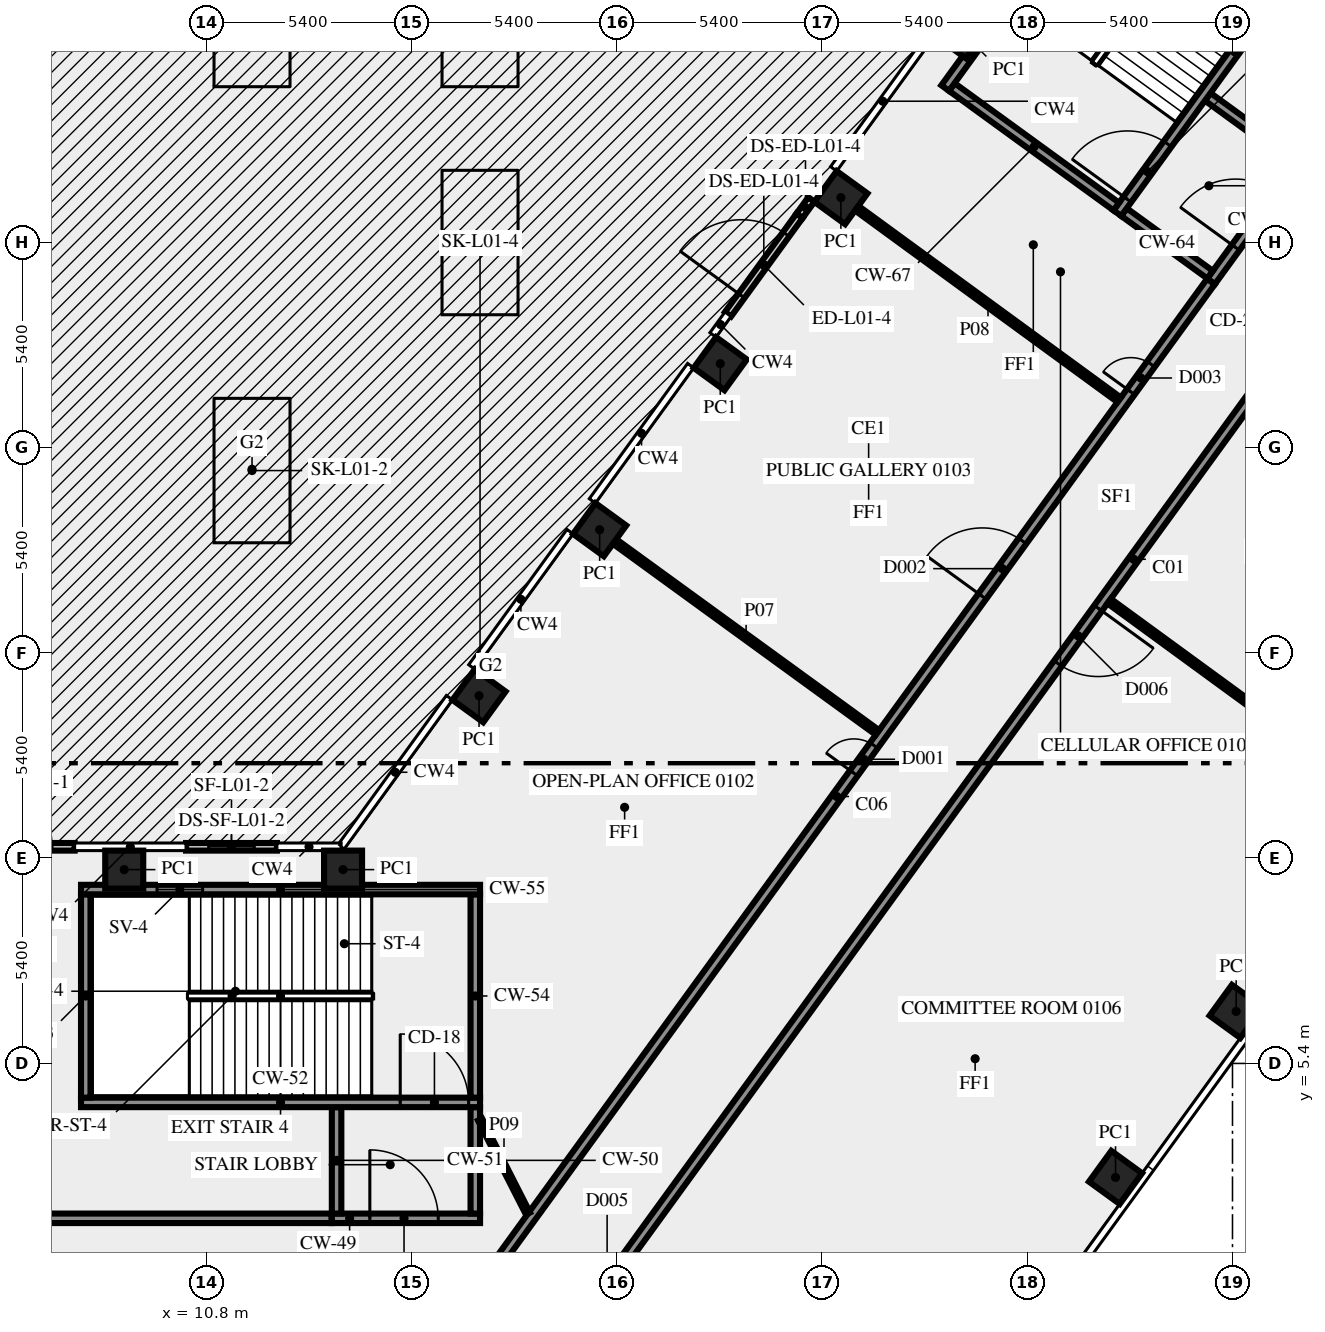
"""IFC4 building model, lengths in metres.
Left out: names, types, materials, properties, quantities, classifications, styles, units other than length and angle.
Written with IfcOpenShell. Run it as: python <this file> out.ifc"""

import sys

from ifc_helpers import new_model, si_unit, direction, frame, frame_2d, origin, origin_2d, place, context, subcontext, project, spatial, rectangle, extrude, element, fill, save


model = new_model("IFC4")
c1 = context("Model", 3, precision=1e-05, world=origin(), true_north=direction((0.0, 1.0)))
c2 = subcontext(c1, "Body", "Model", "MODEL_VIEW")
j1 = project(units=[si_unit("LENGTHUNIT", "METRE"), si_unit("PLANEANGLEUNIT", "RADIAN")], contexts=[c1])
p1 = place(None, origin())
s1 = spatial("IfcSite", under=j1, at=p1, CompositionType="ELEMENT")
p2 = place(p1, origin())
s2 = spatial("IfcBuilding", under=s1, at=p2, CompositionType="ELEMENT")
p3 = place(p2, frame((0.0, 0.0, 6.0)))
s3 = spatial("IfcBuildingStorey", under=s2, at=p3, CompositionType="ELEMENT", Elevation=6.0)
for number, where, z_axis, x_axis in (
    (1, (34.722, 2.4, 0.0), (0.0, 0.0, 1.0), (0.588, 0.809, 0.0)),
    (2, (37.896, 6.769, 0.0), (0.0, 0.0, 1.0), (0.588, 0.809, 0.0)),
    (3, (30.669, 32.55, 0.0), (0.0, 0.0, 1.0), (-0.588, -0.809, 0.0)),
    (4, (27.495, 28.181, 0.0), (0.0, 0.0, 1.0), (-0.588, -0.809, 0.0)),
    (5, (24.321, 23.812, 0.0), (0.0, 0.0, 1.0), (-0.588, -0.809, 0.0)),
    (6, (21.147, 19.444, 0.0), (0.0, 0.0, 1.0), (-0.588, -0.809, 0.0)),
    (7, (17.974, 15.075, 0.0), (0.0, 0.0, 1.0), (-0.588, -0.809, 0.0)),
    (8, (14.395, 10.5, 0.0), (0.0, 0.0, 1.0), (-1.0, 0.0, 0.0)),
    (9, (8.637, 10.5, 0.0), (0.0, 0.0, 1.0), (-1.0, 0.0, 0.0)),
):
    element("IfcColumn", number, at=place(p3, frame(where, z_axis=z_axis, x_axis=x_axis)), inside=s3, PredefinedType="COLUMN", context=c2, shape_type="SweptSolid", body=[
        extrude(rectangle(XDim=1.0, YDim=1.0, at=origin_2d()), origin(), (0.0, 0.0, 1.0), 5.1),
    ])
p4 = place(p3, frame((24.525, 25.113, 0.0), z_axis=(0.0, 0.0, 1.0), x_axis=(0.587800113352, 0.809006196974, 0.0)))
e10 = element("IfcWall", 10, at=p4, inside=s3, PredefinedType="SOLIDWALL", context=c2, shape_type="SweptSolid", body=[
    extrude(rectangle(XDim=3.204, YDim=0.2, at=frame_2d((1.602, 0.0))), origin(), (0.0, 0.0, 1.0), 5.1),
])
p5 = place(p4, frame((0.602, 0.0, 0.0)))
e11 = element("IfcOpeningElement", 11, at=p5, cuts=e10, PredefinedType="OPENING", context=c2, shape_type="SweptSolid", body=[
    extrude(rectangle(XDim=2.0, YDim=2.4, at=frame_2d((1.0, 1.2))), frame((0.0, 0.11, 0.0), z_axis=(0.0, -1.0, 0.0), x_axis=(1.0, 0.0, 0.0)), (0.0, 0.0, 1.0), 0.22),
])
p6 = place(p3, frame((12.655, 11.1, 0.0), z_axis=(0.0, 0.0, 1.0), x_axis=(-1.0, 0.0, 0.0)))
e12 = element("IfcWall", 12, at=p6, inside=s3, PredefinedType="SOLIDWALL", context=c2, shape_type="SweptSolid", body=[
    extrude(rectangle(XDim=2.392, YDim=0.2, at=frame_2d((1.196, 0.0))), origin(), (0.0, 0.0, 1.0), 5.1),
])
p7 = place(p6, frame((0.596, 0.0, 1.0)))
e13 = element("IfcOpeningElement", 13, at=p7, cuts=e12, PredefinedType="OPENING", context=c2, shape_type="SweptSolid", body=[
    extrude(rectangle(XDim=1.2, YDim=1.2, at=frame_2d((0.6, 0.6))), frame((0.0, 0.11, 0.0), z_axis=(0.0, -1.0, 0.0), x_axis=(1.0, 0.0, 0.0)), (0.0, 0.0, 1.0), 0.22),
])
p8 = place(p3, frame((4.143, 11.1, 0.0), z_axis=(0.0, 0.0, 1.0), x_axis=(1.0, 0.0, 0.0)))
e14 = element("IfcWall", 14, at=p8, inside=s3, PredefinedType="SOLIDWALL", context=c2, shape_type="SweptSolid", body=[
    extrude(rectangle(XDim=3.189, YDim=0.2, at=frame_2d((1.594, 0.0))), origin(), (0.0, 0.0, 1.0), 5.1),
])
p9 = place(p8, frame((0.594, 0.0, 0.0)))
e15 = element("IfcOpeningElement", 15, at=p9, cuts=e14, PredefinedType="OPENING", context=c2, shape_type="SweptSolid", body=[
    extrude(rectangle(XDim=2.0, YDim=2.4, at=frame_2d((1.0, 1.2))), frame((0.0, 0.11, 0.0), z_axis=(0.0, -1.0, 0.0), x_axis=(1.0, 0.0, 0.0)), (0.0, 0.0, 1.0), 0.22),
])
p10 = place(p3, frame((14.1, 1.325, 0.0), z_axis=(0.0, 0.0, 1.0), x_axis=(1.0, 0.0, 0.0)))
e16 = element("IfcWall", 16, at=p10, inside=s3, PredefinedType="SHEAR", context=c2, shape_type="SweptSolid", body=[
    extrude(rectangle(XDim=3.9, YDim=0.25, at=frame_2d((1.95, 0.0))), origin(), (0.0, 0.0, 1.0), 5.1),
])
p11 = place(p10, frame((1.0, 0.0, 0.0)))
e17 = element("IfcOpeningElement", 17, at=p11, cuts=e16, PredefinedType="OPENING", context=c2, shape_type="SweptSolid", body=[
    extrude(rectangle(XDim=1.8, YDim=2.1, at=frame_2d((0.9, 1.05))), frame((0.0, 0.135, 0.0), z_axis=(0.0, -1.0, 0.0), x_axis=(1.0, 0.0, 0.0)), (0.0, 0.0, 1.0), 0.27),
])
for number, where, z_axis, x_axis in (
    (18, (14.225, 1.45, 0.0), (0.0, 0.0, 1.0), (0.0, 1.0, 0.0)),
    (19, (17.875, 1.45, 0.0), (0.0, 0.0, 1.0), (0.0, 1.0, 0.0)),
):
    element("IfcWall", number, at=place(p3, frame(where, z_axis=z_axis, x_axis=x_axis)), inside=s3, PredefinedType="SHEAR", context=c2, shape_type="SweptSolid", body=[
        extrude(rectangle(XDim=2.8, YDim=0.25, at=frame_2d((1.4, 0.0))), origin(), (0.0, 0.0, 1.0), 5.1),
    ])
p12 = place(p3, frame((7.5, 4.375, 0.0), z_axis=(0.0, 0.0, 1.0), x_axis=(1.0, 0.0, 0.0)))
e20 = element("IfcWall", 20, at=p12, inside=s3, PredefinedType="SHEAR", context=c2, shape_type="SweptSolid", body=[
    extrude(rectangle(XDim=10.5, YDim=0.25, at=frame_2d((5.25, 0.0))), origin(), (0.0, 0.0, 1.0), 5.1),
])
p13 = place(p12, frame((8.4, 0.0, 0.0)))
e21 = element("IfcOpeningElement", 21, at=p13, cuts=e20, PredefinedType="OPENING", context=c2, shape_type="SweptSolid", body=[
    extrude(rectangle(XDim=1.8, YDim=2.1, at=frame_2d((0.9, 1.05))), frame((0.0, 0.135, 0.0), z_axis=(0.0, -1.0, 0.0), x_axis=(1.0, 0.0, 0.0)), (0.0, 0.0, 1.0), 0.27),
])
for number, where, z_axis, x_axis in (
    (22, (7.625, 4.5, 0.0), (0.0, 0.0, 1.0), (0.0, 1.0, 0.0)),
    (23, (17.875, 4.5, 0.0), (0.0, 0.0, 1.0), (0.0, 1.0, 0.0)),
):
    element("IfcWall", number, at=place(p3, frame(where, z_axis=z_axis, x_axis=x_axis)), inside=s3, PredefinedType="SHEAR", context=c2, shape_type="SweptSolid", body=[
        extrude(rectangle(XDim=5.35, YDim=0.25, at=frame_2d((2.675, 0.0))), origin(), (0.0, 0.0, 1.0), 5.1),
    ])
p14 = place(p3, frame((7.5, 9.975, 0.0), z_axis=(0.0, 0.0, 1.0), x_axis=(1.0, 0.0, 0.0)))
e24 = element("IfcWall", 24, at=p14, inside=s3, PredefinedType="SHEAR", context=c2, shape_type="SweptSolid", body=[
    extrude(rectangle(XDim=10.5, YDim=0.25, at=frame_2d((5.25, 0.0))), origin(), (0.0, 0.0, 1.0), 5.1),
])
p15 = place(p14, frame((2.0, 0.0, 1.0)))
e25 = element("IfcOpeningElement", 25, at=p15, cuts=e24, PredefinedType="OPENING", context=c2, shape_type="SweptSolid", body=[
    extrude(rectangle(XDim=1.2, YDim=1.2, at=frame_2d((0.6, 0.6))), frame((0.0, 0.135, 0.0), z_axis=(0.0, -1.0, 0.0), x_axis=(1.0, 0.0, 0.0)), (0.0, 0.0, 1.0), 0.27),
])
p16 = place(p3, frame((37.238, 25.98, 0.0), z_axis=(0.0, 0.0, 1.0), x_axis=(0.587772420479, 0.809026317077, 0.0)))
e26 = element("IfcWall", 26, at=p16, inside=s3, PredefinedType="SHEAR", context=c2, shape_type="SweptSolid", body=[
    extrude(rectangle(XDim=4.0, YDim=0.25, at=frame_2d((2.0, 0.0))), origin(), (0.0, 0.0, 1.0), 5.1),
])
p17 = place(p16, frame((1.1, 0.0, 0.0)))
e27 = element("IfcOpeningElement", 27, at=p17, cuts=e26, PredefinedType="OPENING", context=c2, shape_type="SweptSolid", body=[
    extrude(rectangle(XDim=1.8, YDim=2.1, at=frame_2d((0.9, 1.05))), frame((0.0, 0.135, 0.0), z_axis=(0.0, -1.0, 0.0), x_axis=(1.0, 0.0, 0.0)), (0.0, 0.0, 1.0), 0.27),
])
for number, where, z_axis, x_axis in (
    (28, (37.21, 26.154, 0.0), (0.0, 0.0, 1.0), (-0.809, 0.588, 0.0)),
    (29, (39.414, 29.188, 0.0), (0.0, 0.0, 1.0), (-0.809, 0.588, 0.0)),
):
    element("IfcWall", number, at=place(p3, frame(where, z_axis=z_axis, x_axis=x_axis)), inside=s3, PredefinedType="SHEAR", context=c2, shape_type="SweptSolid", body=[
        extrude(rectangle(XDim=2.8, YDim=0.25, at=frame_2d((1.4, 0.0))), origin(), (0.0, 0.0, 1.0), 5.1),
    ])
p18 = place(p3, frame((34.77, 27.772, 0.0), z_axis=(0.0, 0.0, 1.0), x_axis=(0.587795589702, 0.809009483706, 0.0)))
e30 = element("IfcWall", 30, at=p18, inside=s3, PredefinedType="SHEAR", context=c2, shape_type="SweptSolid", body=[
    extrude(rectangle(XDim=10.5, YDim=0.25, at=frame_2d((5.25, 0.0))), origin(), (0.0, 0.0, 1.0), 5.1),
])
p19 = place(p18, frame((0.45, 0.0, 0.0)))
e31 = element("IfcOpeningElement", 31, at=p19, cuts=e30, PredefinedType="OPENING", context=c2, shape_type="SweptSolid", body=[
    extrude(rectangle(XDim=1.8, YDim=2.1, at=frame_2d((0.9, 1.05))), frame((0.0, 0.135, 0.0), z_axis=(0.0, -1.0, 0.0), x_axis=(1.0, 0.0, 0.0)), (0.0, 0.0, 1.0), 0.27),
])
p20 = place(p3, frame((34.742, 27.947, 0.0), z_axis=(0.0, 0.0, 1.0), x_axis=(-0.8089984606, 0.587810760999, 0.0)))
e32 = element("IfcWall", 32, at=p20, inside=s3, PredefinedType="SHEAR", context=c2, shape_type="SweptSolid", body=[
    extrude(rectangle(XDim=5.35, YDim=0.25, at=frame_2d((2.675, 0.0))), origin(), (0.0, 0.0, 1.0), 5.1),
])
p21 = place(p3, frame((30.24, 31.064, 0.0), z_axis=(0.0, 0.0, 1.0), x_axis=(0.587795589702, 0.809009483706, 0.0)))
e33 = element("IfcWall", 33, at=p21, inside=s3, PredefinedType="SHEAR", context=c2, shape_type="SweptSolid", body=[
    extrude(rectangle(XDim=10.5, YDim=0.25, at=frame_2d((5.25, 0.0))), origin(), (0.0, 0.0, 1.0), 5.1),
])
p22 = place(p21, frame((2.15, 0.0, 1.0)))
e34 = element("IfcOpeningElement", 34, at=p22, cuts=e33, PredefinedType="OPENING", context=c2, shape_type="SweptSolid", body=[
    extrude(rectangle(XDim=1.2, YDim=1.2, at=frame_2d((0.6, 0.6))), frame((0.0, 0.135, 0.0), z_axis=(0.0, -1.0, 0.0), x_axis=(1.0, 0.0, 0.0)), (0.0, 0.0, 1.0), 0.27),
])
p23 = place(p3, frame((49.869, 38.856, 0.0), z_axis=(0.0, 0.0, 1.0), x_axis=(-0.587784522481, -0.809017524614, 0.0)))
e35 = element("IfcWall", 35, at=p23, inside=s3, PredefinedType="SOLIDWALL", context=c2, shape_type="SweptSolid", body=[
    extrude(rectangle(XDim=49.912, YDim=0.25, at=frame_2d((24.956, 0.0))), origin(), (0.0, 0.0, 1.0), 5.1),
])
p24 = place(p23, frame((17.146, 0.0, 0.0)))
e36 = element("IfcOpeningElement", 36, at=p24, cuts=e35, PredefinedType="OPENING", context=c2, shape_type="SweptSolid", body=[
    extrude(rectangle(XDim=0.9, YDim=2.1, at=frame_2d((0.45, 1.05))), frame((0.0, 0.135, 0.0), z_axis=(0.0, -1.0, 0.0), x_axis=(1.0, 0.0, 0.0)), (0.0, 0.0, 1.0), 0.27),
])
p25 = place(p23, frame((47.629, 0.0, 0.0)))
e37 = element("IfcOpeningElement", 37, at=p25, cuts=e35, PredefinedType="OPENING", context=c2, shape_type="SweptSolid", body=[
    extrude(rectangle(XDim=1.8, YDim=2.1, at=frame_2d((0.9, 1.05))), frame((0.0, 0.135, 0.0), z_axis=(0.0, -1.0, 0.0), x_axis=(1.0, 0.0, 0.0)), (0.0, 0.0, 1.0), 0.27),
])
p26 = place(p23, frame((26.547, 0.0, 0.0)))
e38 = element("IfcOpeningElement", 38, at=p26, cuts=e35, PredefinedType="OPENING", context=c2, shape_type="SweptSolid", body=[
    extrude(rectangle(XDim=1.8, YDim=2.1, at=frame_2d((0.9, 1.05))), frame((0.0, 0.135, 0.0), z_axis=(0.0, -1.0, 0.0), x_axis=(1.0, 0.0, 0.0)), (0.0, 0.0, 1.0), 0.27),
])
p27 = place(p23, frame((0.442, 0.0, 0.0)))
e39 = element("IfcOpeningElement", 39, at=p27, cuts=e35, PredefinedType="OPENING", context=c2, shape_type="SweptSolid", body=[
    extrude(rectangle(XDim=0.9, YDim=2.1, at=frame_2d((0.45, 1.05))), frame((0.0, 0.135, 0.0), z_axis=(0.0, -1.0, 0.0), x_axis=(1.0, 0.0, 0.0)), (0.0, 0.0, 1.0), 0.27),
])
p28 = place(p3, frame((-14.09, 1.325, 0.0), z_axis=(0.0, 0.0, 1.0), x_axis=(1.0, 0.0, 0.0)))
e40 = element("IfcWall", 40, at=p28, inside=s3, PredefinedType="SOLIDWALL", context=c2, shape_type="SweptSolid", body=[
    extrude(rectangle(XDim=28.18, YDim=0.25, at=frame_2d((14.09, 0.0))), origin(), (0.0, 0.0, 1.0), 5.1),
])
p29 = place(p28, frame((13.19, 0.0, 0.0)))
e41 = element("IfcOpeningElement", 41, at=p29, cuts=e40, PredefinedType="OPENING", context=c2, shape_type="SweptSolid", body=[
    extrude(rectangle(XDim=1.8, YDim=2.1, at=frame_2d((0.9, 1.05))), frame((0.0, 0.135, 0.0), z_axis=(0.0, -1.0, 0.0), x_axis=(1.0, 0.0, 0.0)), (0.0, 0.0, 1.0), 0.27),
])
p30 = place(p3, frame((17.545, -1.125, 0.0), z_axis=(0.0, 0.0, 1.0), x_axis=(0.587786323093, 0.809016216391, 0.0)))
e42 = element("IfcWall", 42, at=p30, inside=s3, PredefinedType="SOLIDWALL", context=c2, shape_type="SweptSolid", body=[
    extrude(rectangle(XDim=33.493, YDim=0.25, at=frame_2d((16.747, 0.0))), origin(), (0.0, 0.0, 1.0), 5.1),
])
p31 = place(p30, frame((17.508, 0.0, 0.0)))
e43 = element("IfcOpeningElement", 43, at=p31, cuts=e42, PredefinedType="OPENING", context=c2, shape_type="SweptSolid", body=[
    extrude(rectangle(XDim=0.9, YDim=2.1, at=frame_2d((0.45, 1.05))), frame((0.0, 0.135, 0.0), z_axis=(0.0, -1.0, 0.0), x_axis=(1.0, 0.0, 0.0)), (0.0, 0.0, 1.0), 0.27),
])
p32 = place(p30, frame((29.908, 0.0, 0.0)))
e44 = element("IfcOpeningElement", 44, at=p32, cuts=e42, PredefinedType="OPENING", context=c2, shape_type="SweptSolid", body=[
    extrude(rectangle(XDim=0.9, YDim=2.1, at=frame_2d((0.45, 1.05))), frame((0.0, 0.135, 0.0), z_axis=(0.0, -1.0, 0.0), x_axis=(1.0, 0.0, 0.0)), (0.0, 0.0, 1.0), 0.27),
])
p33 = place(p30, frame((23.258, 0.0, 0.0)))
e45 = element("IfcOpeningElement", 45, at=p33, cuts=e42, PredefinedType="OPENING", context=c2, shape_type="SweptSolid", body=[
    extrude(rectangle(XDim=1.8, YDim=2.1, at=frame_2d((0.9, 1.05))), frame((0.0, 0.135, 0.0), z_axis=(0.0, -1.0, 0.0), x_axis=(1.0, 0.0, 0.0)), (0.0, 0.0, 1.0), 0.27),
])
p34 = place(p3, frame((34.554, 17.565, 0.0), z_axis=(0.0, 0.0, 1.0), x_axis=(0.807645841498, -0.589667868135, 0.0)))
e46 = element("IfcWall", 46, at=p34, inside=s3, PredefinedType="PARTITIONING", context=c2, shape_type="SweptSolid", body=[
    extrude(rectangle(XDim=9.551, YDim=0.15, at=frame_2d((4.775, 0.0))), origin(), (0.0, 0.0, 1.0), 4.1),
])
p35 = place(p3, frame((28.457, 14.108, 0.0), z_axis=(0.0, 0.0, 1.0), x_axis=(-0.809000394931, 0.587808098789, 0.0)))
e47 = element("IfcWall", 47, at=p35, inside=s3, PredefinedType="PARTITIONING", context=c2, shape_type="SweptSolid", body=[
    extrude(rectangle(XDim=8.545, YDim=0.15, at=frame_2d((4.272, 0.0))), origin(), (0.0, 0.0, 1.0), 5.1),
])
p36 = place(p3, frame((27.915, 27.901, 0.0), z_axis=(0.0, 0.0, 1.0), x_axis=(0.80766005508, -0.589648399836, 0.0)))
e48 = element("IfcWall", 48, at=p36, inside=s3, PredefinedType="PARTITIONING", context=c2, shape_type="SweptSolid", body=[
    extrude(rectangle(XDim=8.547, YDim=0.15, at=frame_2d((4.273, 0.0))), origin(), (0.0, 0.0, 1.0), 5.1),
])
p37 = place(p3, frame((18.0, 3.925, 0.0), z_axis=(0.0, 0.0, 1.0), x_axis=(0.453950796792, -0.891026752736, 0.0)))
e49 = element("IfcWall", 49, at=p37, inside=s3, PredefinedType="PARTITIONING", context=c2, shape_type="SweptSolid", body=[
    extrude(rectangle(XDim=2.778, YDim=0.12, at=frame_2d((1.389, 0.0))), origin(), (0.0, 0.0, 1.0), 5.1),
])
p38 = place(p3, frame((26.409, 27.705, 0.0), z_axis=(0.0, 0.0, 1.0), x_axis=(0.587649242333, 0.809115793929, 0.0)))
e50 = element("IfcWall", 50, at=p38, inside=s3, PredefinedType="SOLIDWALL", context=c2, shape_type="SweptSolid", body=[
    extrude(rectangle(XDim=0.528, YDim=0.2, at=frame_2d((0.264, 0.0))), origin(), (0.0, 0.0, 1.0), 5.1),
])
p39 = place(p5, origin())
e51 = element("IfcDoor", 51, at=p39, inside=s3, OperationType="DOUBLE_DOOR_SINGLE_SWING", PredefinedType="DOOR", context=c2, shape_type="SweptSolid", body=[
    extrude(rectangle(XDim=2.0, YDim=2.4, at=frame_2d((1.0, 1.2))), frame((0.0, 0.025, 0.0), z_axis=(0.0, -1.0, 0.0), x_axis=(1.0, 0.0, 0.0)), (0.0, 0.0, 1.0), 0.05),
])
fill(e11, e51)
p40 = place(p7, origin())
e52 = element("IfcWindow", 52, at=p40, inside=s3, PartitioningType="SINGLE_PANEL", PredefinedType="WINDOW", context=c2, shape_type="SweptSolid", body=[
    extrude(rectangle(XDim=1.2, YDim=1.2, at=frame_2d((0.6, 0.6))), frame((0.0, 0.03, 0.0), z_axis=(0.0, -1.0, 0.0), x_axis=(1.0, 0.0, 0.0)), (0.0, 0.0, 1.0), 0.06),
])
fill(e13, e52)
p41 = place(p3, frame((0.0, 0.0, -0.4)))
p42 = place(p41, frame((12.0, 21.0, 0.0)))
p43 = place(p42, frame((0.0, 0.0, 0.35)))
e53 = element("IfcWindow", 53, at=p43, inside=s3, PartitioningType="SINGLE_PANEL", PredefinedType="SKYLIGHT", context=c2, shape_type="SweptSolid", body=[
    extrude(rectangle(XDim=1.2, YDim=3.0, at=origin_2d()), origin(), (0.0, 0.0, 1.0), 0.05),
])
p44 = place(p41, frame((18.0, 27.0, 0.0)))
p45 = place(p44, frame((0.0, 0.0, 0.35)))
e54 = element("IfcWindow", 54, at=p45, inside=s3, PartitioningType="SINGLE_PANEL", PredefinedType="SKYLIGHT", context=c2, shape_type="SweptSolid", body=[
    extrude(rectangle(XDim=1.2, YDim=3.0, at=origin_2d()), origin(), (0.0, 0.0, 1.0), 0.05),
])
p46 = place(p41, frame((12.0, 33.0, 0.0)))
p47 = place(p46, frame((0.0, 0.0, 0.35)))
e55 = element("IfcWindow", 55, at=p47, inside=s3, PartitioningType="SINGLE_PANEL", PredefinedType="SKYLIGHT", context=c2, shape_type="SweptSolid", body=[
    extrude(rectangle(XDim=1.2, YDim=3.0, at=origin_2d()), origin(), (0.0, 0.0, 1.0), 0.05),
])
p48 = place(p41, frame((18.0, 33.0, 0.0)))
p49 = place(p48, frame((0.0, 0.0, 0.35)))
e56 = element("IfcWindow", 56, at=p49, inside=s3, PartitioningType="SINGLE_PANEL", PredefinedType="SKYLIGHT", context=c2, shape_type="SweptSolid", body=[
    extrude(rectangle(XDim=1.2, YDim=3.0, at=origin_2d()), origin(), (0.0, 0.0, 1.0), 0.05),
])
p50 = place(p11, origin())
e57 = element("IfcDoor", 57, at=p50, inside=s3, OperationType="DOUBLE_DOOR_SINGLE_SWING", PredefinedType="DOOR", context=c2, shape_type="SweptSolid", body=[
    extrude(rectangle(XDim=1.8, YDim=2.1, at=frame_2d((0.9, 1.05))), frame((0.0, 0.025, 0.0), z_axis=(0.0, -1.0, 0.0), x_axis=(1.0, 0.0, 0.0)), (0.0, 0.0, 1.0), 0.05),
])
fill(e17, e57)
p51 = place(p13, origin())
e58 = element("IfcDoor", 58, at=p51, inside=s3, OperationType="DOUBLE_DOOR_SINGLE_SWING", PredefinedType="DOOR", context=c2, shape_type="SweptSolid", body=[
    extrude(rectangle(XDim=1.8, YDim=2.1, at=frame_2d((0.9, 1.05))), frame((0.0, 0.025, 0.0), z_axis=(0.0, -1.0, 0.0), x_axis=(1.0, 0.0, 0.0)), (0.0, 0.0, 1.0), 0.05),
])
fill(e21, e58)
p52 = place(p15, origin())
e59 = element("IfcWindow", 59, at=p52, inside=s3, PartitioningType="SINGLE_PANEL", PredefinedType="WINDOW", context=c2, shape_type="SweptSolid", body=[
    extrude(rectangle(XDim=1.2, YDim=1.2, at=frame_2d((0.6, 0.6))), frame((0.0, 0.03, 0.0), z_axis=(0.0, -1.0, 0.0), x_axis=(1.0, 0.0, 0.0)), (0.0, 0.0, 1.0), 0.06),
])
fill(e25, e59)
p53 = place(p17, origin())
e60 = element("IfcDoor", 60, at=p53, inside=s3, OperationType="DOUBLE_DOOR_SINGLE_SWING", PredefinedType="DOOR", context=c2, shape_type="SweptSolid", body=[
    extrude(rectangle(XDim=1.8, YDim=2.1, at=frame_2d((0.9, 1.05))), frame((0.0, 0.025, 0.0), z_axis=(0.0, -1.0, 0.0), x_axis=(1.0, 0.0, 0.0)), (0.0, 0.0, 1.0), 0.05),
])
fill(e27, e60)
p54 = place(p19, origin())
e61 = element("IfcDoor", 61, at=p54, inside=s3, OperationType="DOUBLE_DOOR_SINGLE_SWING", PredefinedType="DOOR", context=c2, shape_type="SweptSolid", body=[
    extrude(rectangle(XDim=1.8, YDim=2.1, at=frame_2d((0.9, 1.05))), frame((0.0, 0.025, 0.0), z_axis=(0.0, -1.0, 0.0), x_axis=(1.0, 0.0, 0.0)), (0.0, 0.0, 1.0), 0.05),
])
fill(e31, e61)
p55 = place(p31, origin())
e62 = element("IfcDoor", 62, at=p55, inside=s3, OperationType="SINGLE_SWING_RIGHT", PredefinedType="DOOR", context=c2, shape_type="SweptSolid", body=[
    extrude(rectangle(XDim=0.9, YDim=2.1, at=frame_2d((0.45, 1.05))), frame((0.0, 0.025, 0.0), z_axis=(0.0, -1.0, 0.0), x_axis=(1.0, 0.0, 0.0)), (0.0, 0.0, 1.0), 0.05),
])
fill(e43, e62)
p56 = place(p32, origin())
e63 = element("IfcDoor", 63, at=p56, inside=s3, OperationType="SINGLE_SWING_LEFT", PredefinedType="DOOR", context=c2, shape_type="SweptSolid", body=[
    extrude(rectangle(XDim=0.9, YDim=2.1, at=frame_2d((0.45, 1.05))), frame((0.0, 0.025, 0.0), z_axis=(0.0, -1.0, 0.0), x_axis=(1.0, 0.0, 0.0)), (0.0, 0.0, 1.0), 0.05),
])
fill(e44, e63)
p57 = place(p26, origin())
e64 = element("IfcDoor", 64, at=p57, inside=s3, OperationType="DOUBLE_DOOR_SINGLE_SWING", PredefinedType="DOOR", context=c2, shape_type="SweptSolid", body=[
    extrude(rectangle(XDim=1.8, YDim=2.1, at=frame_2d((0.9, 1.05))), frame((0.0, 0.025, 0.0), z_axis=(0.0, -1.0, 0.0), x_axis=(1.0, 0.0, 0.0)), (0.0, 0.0, 1.0), 0.05),
])
fill(e38, e64)
p58 = place(p33, origin())
e65 = element("IfcDoor", 65, at=p58, inside=s3, OperationType="DOUBLE_DOOR_SINGLE_SWING", PredefinedType="DOOR", context=c2, shape_type="SweptSolid", body=[
    extrude(rectangle(XDim=1.8, YDim=2.1, at=frame_2d((0.9, 1.05))), frame((0.0, 0.025, 0.0), z_axis=(0.0, -1.0, 0.0), x_axis=(1.0, 0.0, 0.0)), (0.0, 0.0, 1.0), 0.05),
])
fill(e45, e65)
save(model, sys.argv[1])
